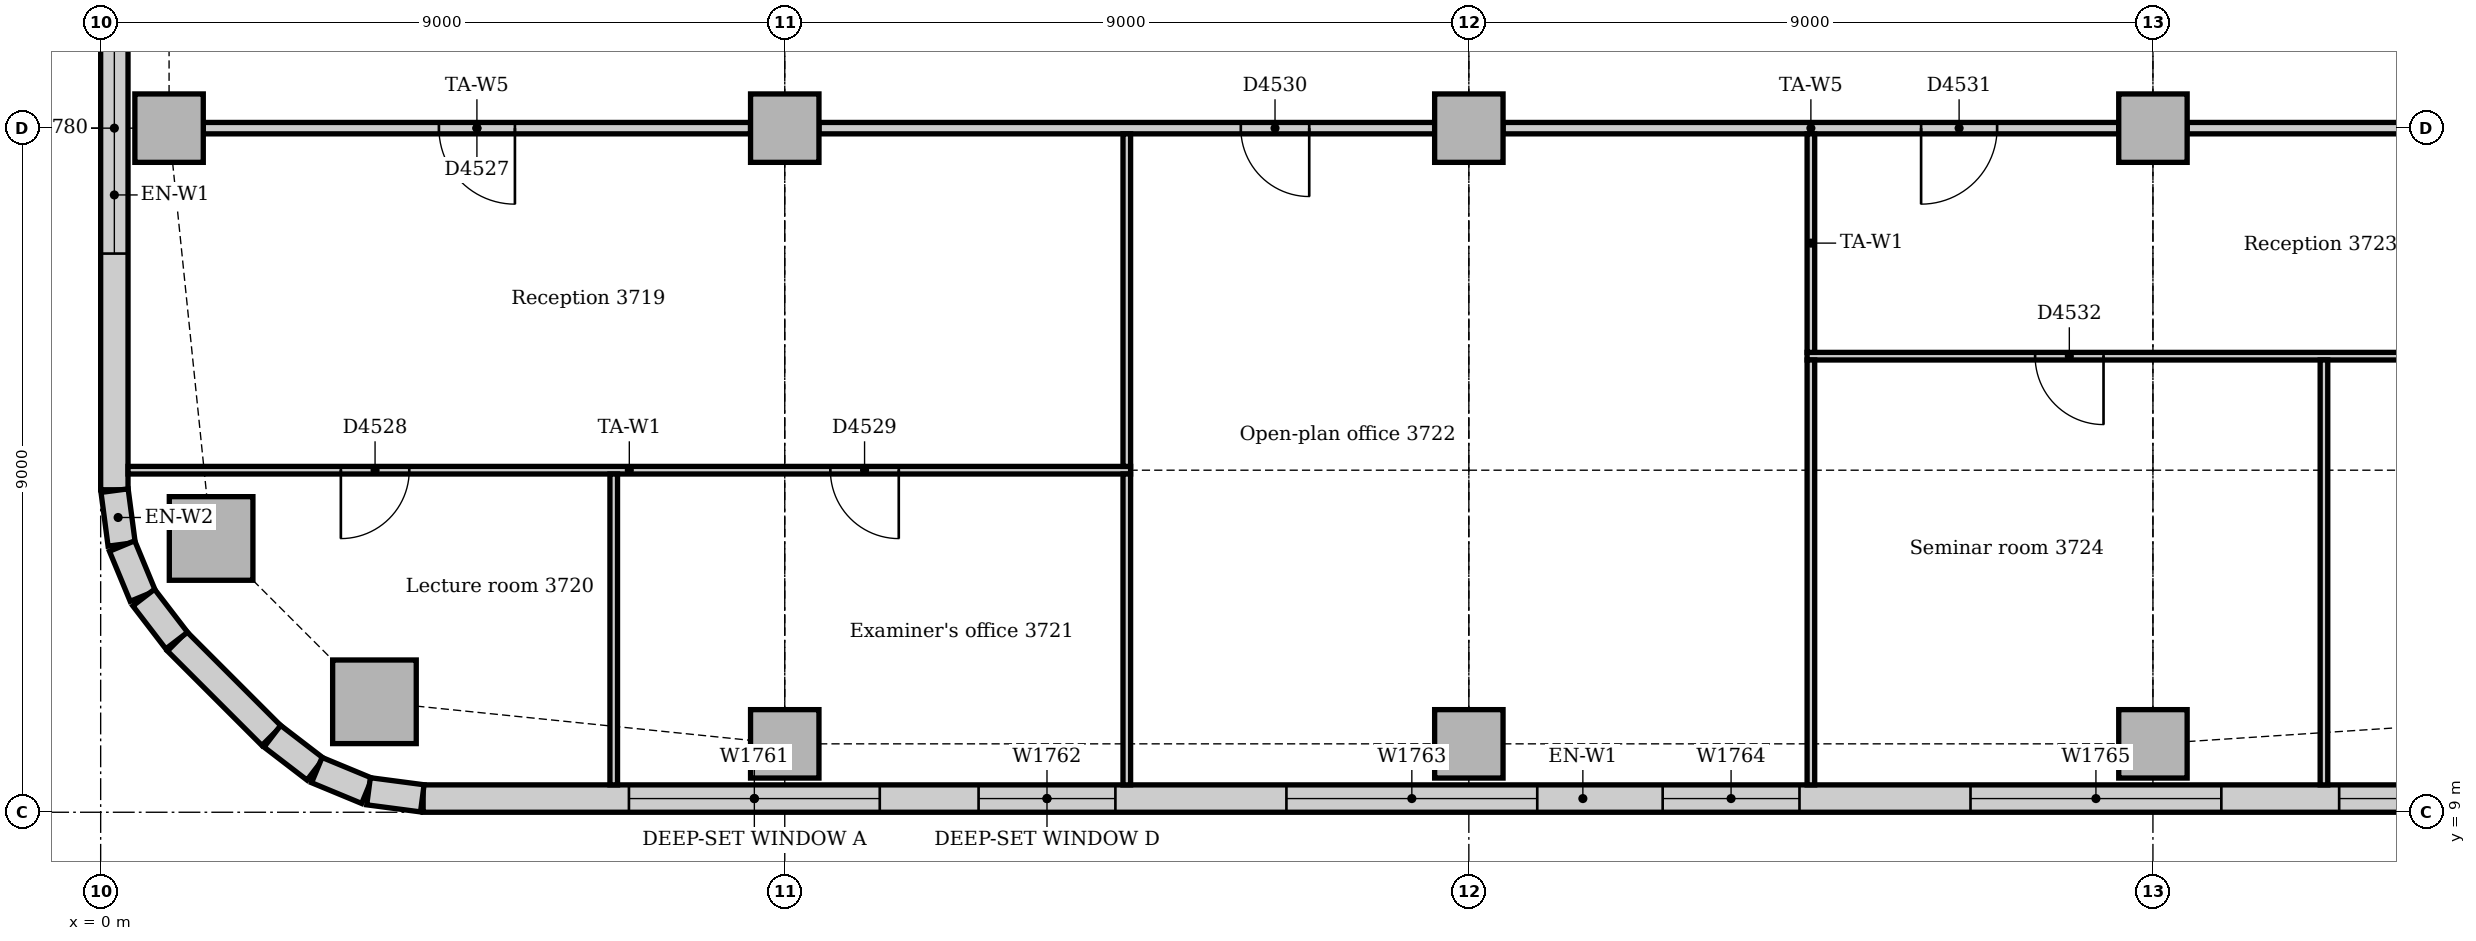
"""IFC4 building model, lengths in metres.
Left out: names, types, materials, properties, quantities, classifications, styles, units other than length and angle.
Written with IfcOpenShell. Run it as: python <this file> out.ifc"""

import sys

from ifc_helpers import new_model, si_unit, direction, frame, frame_2d, origin, origin_2d, place, context, subcontext, project, spatial, rectangle, extrude, element, fill, save


model = new_model("IFC4")
c1 = context("Model", 3, precision=1e-05, world=origin(), true_north=direction((0.0, 1.0)))
c2 = subcontext(c1, "Body", "Model", "MODEL_VIEW")
j1 = project(units=[si_unit("LENGTHUNIT", "METRE"), si_unit("PLANEANGLEUNIT", "RADIAN")], contexts=[c1])
p1 = place(None, origin())
s1 = spatial("IfcSite", under=j1, at=p1, CompositionType="ELEMENT")
p2 = place(p1, origin())
s2 = spatial("IfcBuilding", under=s1, at=p2, CompositionType="ELEMENT")
p3 = place(p2, frame((0.0, 0.0, 157.0)))
s3 = spatial("IfcBuildingStorey", under=s2, at=p3, CompositionType="ELEMENT", Elevation=157.0)
for number, where, z_axis, x_axis in (
    (1, (3.602, 10.453, 0.0), (0.0, 0.0, 1.0), (1.0, 0.0, 0.0)),
    (2, (1.453, 12.602, 0.0), (0.0, 0.0, 1.0), (1.0, 0.0, 0.0)),
):
    element("IfcColumn", number, at=place(p3, frame(where, z_axis=z_axis, x_axis=x_axis)), inside=s3, PredefinedType="COLUMN", context=c2, shape_type="SweptSolid", body=[
        extrude(rectangle(XDim=1.1, YDim=1.1, at=origin_2d()), origin(), (0.0, 0.0, 1.0), 3.85),
    ])
for number, where, z_axis, x_axis in (
    (3, (9.0, 9.9, 0.0), (0.0, 0.0, 1.0), (1.0, 0.0, 0.0)),
    (4, (18.0, 9.9, 0.0), (0.0, 0.0, 1.0), (1.0, 0.0, 0.0)),
    (5, (27.0, 9.9, 0.0), (0.0, 0.0, 1.0), (1.0, 0.0, 0.0)),
    (6, (0.9, 18.0, 0.0), (0.0, 0.0, 1.0), (1.0, 0.0, 0.0)),
    (7, (9.0, 18.0, 0.0), (0.0, 0.0, 1.0), (1.0, 0.0, 0.0)),
    (8, (18.0, 18.0, 0.0), (0.0, 0.0, 1.0), (1.0, 0.0, 0.0)),
    (9, (27.0, 18.0, 0.0), (0.0, 0.0, 1.0), (1.0, 0.0, 0.0)),
):
    element("IfcColumn", number, at=place(p3, frame(where, z_axis=z_axis, x_axis=x_axis)), inside=s3, PredefinedType="COLUMN", context=c2, shape_type="SweptSolid", body=[
        extrude(rectangle(XDim=0.9, YDim=0.9, at=origin_2d()), origin(), (0.0, 0.0, 1.0), 3.85),
    ])
p4 = place(p3, frame((4.243, 9.18, 0.0), z_axis=(0.0, 0.0, 1.0), x_axis=(1.0, 0.0, 0.0)))
e10 = element("IfcWall", 10, at=p4, inside=s3, PredefinedType="STANDARD", context=c2, shape_type="SweptSolid", body=[
    extrude(rectangle(XDim=30.515, YDim=0.36, at=frame_2d((15.257, 0.0))), origin(), (0.0, 0.0, 1.0), 3.85),
])
p5 = place(p4, frame((2.707, 0.0, 0.9)))
e11 = element("IfcOpeningElement", 11, at=p5, cuts=e10, PredefinedType="OPENING", context=c2, shape_type="SweptSolid", body=[
    extrude(rectangle(XDim=3.3, YDim=1.6, at=frame_2d((1.65, 0.8))), frame((0.0, 0.19, 0.0), z_axis=(0.0, -1.0, 0.0), x_axis=(1.0, 0.0, 0.0)), (0.0, 0.0, 1.0), 0.38),
])
p6 = place(p4, frame((7.307, 0.0, 0.9)))
e12 = element("IfcOpeningElement", 12, at=p6, cuts=e10, PredefinedType="OPENING", context=c2, shape_type="SweptSolid", body=[
    extrude(rectangle(XDim=1.8, YDim=1.6, at=frame_2d((0.9, 0.8))), frame((0.0, 0.19, 0.0), z_axis=(0.0, -1.0, 0.0), x_axis=(1.0, 0.0, 0.0)), (0.0, 0.0, 1.0), 0.38),
])
p7 = place(p4, frame((11.357, 0.0, 0.9)))
e13 = element("IfcOpeningElement", 13, at=p7, cuts=e10, PredefinedType="OPENING", context=c2, shape_type="SweptSolid", body=[
    extrude(rectangle(XDim=3.3, YDim=1.6, at=frame_2d((1.65, 0.8))), frame((0.0, 0.19, 0.0), z_axis=(0.0, -1.0, 0.0), x_axis=(1.0, 0.0, 0.0)), (0.0, 0.0, 1.0), 0.38),
])
p8 = place(p4, frame((16.307, 0.0, 0.9)))
e14 = element("IfcOpeningElement", 14, at=p8, cuts=e10, PredefinedType="OPENING", context=c2, shape_type="SweptSolid", body=[
    extrude(rectangle(XDim=1.8, YDim=1.6, at=frame_2d((0.9, 0.8))), frame((0.0, 0.19, 0.0), z_axis=(0.0, -1.0, 0.0), x_axis=(1.0, 0.0, 0.0)), (0.0, 0.0, 1.0), 0.38),
])
p9 = place(p4, frame((20.357, 0.0, 0.9)))
e15 = element("IfcOpeningElement", 15, at=p9, cuts=e10, PredefinedType="OPENING", context=c2, shape_type="SweptSolid", body=[
    extrude(rectangle(XDim=3.3, YDim=1.6, at=frame_2d((1.65, 0.8))), frame((0.0, 0.19, 0.0), z_axis=(0.0, -1.0, 0.0), x_axis=(1.0, 0.0, 0.0)), (0.0, 0.0, 1.0), 0.38),
])
p10 = place(p4, frame((25.207, 0.0, 0.9)))
e16 = element("IfcOpeningElement", 16, at=p10, cuts=e10, PredefinedType="OPENING", context=c2, shape_type="SweptSolid", body=[
    extrude(rectangle(XDim=3.3, YDim=1.6, at=frame_2d((1.65, 0.8))), frame((0.0, 0.19, 0.0), z_axis=(0.0, -1.0, 0.0), x_axis=(1.0, 0.0, 0.0)), (0.0, 0.0, 1.0), 0.38),
])
p11 = place(p3, frame((0.18, 21.0, 0.0), z_axis=(0.0, 0.0, 1.0), x_axis=(0.0, -1.0, 0.0)))
e17 = element("IfcWall", 17, at=p11, inside=s3, PredefinedType="STANDARD", context=c2, shape_type="SweptSolid", body=[
    extrude(rectangle(XDim=7.757, YDim=0.36, at=frame_2d((3.879, 0.0))), origin(), (0.0, 0.0, 1.0), 3.85),
])
p12 = place(p11, frame((1.35, 0.0, 0.9)))
e18 = element("IfcOpeningElement", 18, at=p12, cuts=e17, PredefinedType="OPENING", context=c2, shape_type="SweptSolid", body=[
    extrude(rectangle(XDim=3.3, YDim=1.6, at=frame_2d((1.65, 0.8))), frame((0.0, 0.19, 0.0), z_axis=(0.0, -1.0, 0.0), x_axis=(1.0, 0.0, 0.0)), (0.0, 0.0, 1.0), 0.38),
])
p13 = place(p3, frame((1.006, 11.249, 0.0), z_axis=(0.0, 0.0, 1.0), x_axis=(0.707106781187, -0.707106781187, 0.0)))
e19 = element("IfcWall", 19, at=p13, inside=s3, PredefinedType="STANDARD", context=c2, shape_type="SweptSolid", body=[
    extrude(rectangle(XDim=1.757, YDim=0.36, at=frame_2d((0.879, 0.0))), origin(), (0.0, 0.0, 1.0), 3.85),
])
for number, where, z_axis, x_axis in (
    (20, (0.183, 13.231, 0.0), (0.0, 0.0, 1.0), (0.131, -0.991, 0.0)),
    (21, (0.282, 12.503, 0.0), (0.0, 0.0, 1.0), (0.383, -0.924, 0.0)),
):
    element("IfcWall", number, at=place(p3, frame(where, z_axis=z_axis, x_axis=x_axis)), inside=s3, PredefinedType="STANDARD", context=c2, shape_type="SweptSolid", body=[
        extrude(rectangle(XDim=0.713, YDim=0.36, at=frame_2d((0.356, 0.0))), origin(), (0.0, 0.0, 1.0), 3.85),
    ])
for number, where, z_axis, x_axis in (
    (22, (0.566, 11.825, 0.0), (0.0, 0.0, 1.0), (0.609, -0.793, 0.0)),
    (23, (2.259, 10.0, 0.0), (0.0, 0.0, 1.0), (0.793, -0.609, 0.0)),
):
    element("IfcWall", number, at=place(p3, frame(where, z_axis=z_axis, x_axis=x_axis)), inside=s3, PredefinedType="STANDARD", context=c2, shape_type="SweptSolid", body=[
        extrude(rectangle(XDim=0.713, YDim=0.36, at=frame_2d((0.357, 0.0))), origin(), (0.0, 0.0, 1.0), 3.85),
    ])
for number, where, z_axis, x_axis in (
    (24, (2.844, 9.555, 0.0), (0.0, 0.0, 1.0), (0.924, -0.383, 0.0)),
    (25, (3.524, 9.276, 0.0), (0.0, 0.0, 1.0), (0.991, -0.131, 0.0)),
):
    element("IfcWall", number, at=place(p3, frame(where, z_axis=z_axis, x_axis=x_axis)), inside=s3, PredefinedType="STANDARD", context=c2, shape_type="SweptSolid", body=[
        extrude(rectangle(XDim=0.713, YDim=0.36, at=frame_2d((0.356, 0.0))), origin(), (0.0, 0.0, 1.0), 3.85),
    ])
p14 = place(p3, frame((1.35, 18.0, 0.0), z_axis=(0.0, 0.0, 1.0), x_axis=(1.0, 0.0, 0.0)))
e26 = element("IfcWall", 26, at=p14, inside=s3, PredefinedType="PARTITIONING", context=c2, shape_type="SweptSolid", body=[
    extrude(rectangle(XDim=7.2, YDim=0.15, at=frame_2d((3.6, 0.0))), origin(), (0.0, 0.0, 1.0), 3.262),
])
p15 = place(p14, frame((3.1, 0.0, 0.0)))
e27 = element("IfcOpeningElement", 27, at=p15, cuts=e26, PredefinedType="OPENING", context=c2, shape_type="SweptSolid", body=[
    extrude(rectangle(XDim=1.0, YDim=2.1, at=frame_2d((0.5, 1.05))), frame((0.0, 0.085, 0.0), z_axis=(0.0, -1.0, 0.0), x_axis=(1.0, 0.0, 0.0)), (0.0, 0.0, 1.0), 0.17),
])
p16 = place(p3, frame((9.45, 18.0, 0.0), z_axis=(0.0, 0.0, 1.0), x_axis=(1.0, 0.0, 0.0)))
e28 = element("IfcWall", 28, at=p16, inside=s3, PredefinedType="PARTITIONING", context=c2, shape_type="SweptSolid", body=[
    extrude(rectangle(XDim=8.1, YDim=0.15, at=frame_2d((4.05, 0.0))), origin(), (0.0, 0.0, 1.0), 3.262),
])
p17 = place(p16, frame((5.55, 0.0, 0.0)))
e29 = element("IfcOpeningElement", 29, at=p17, cuts=e28, PredefinedType="OPENING", context=c2, shape_type="SweptSolid", body=[
    extrude(rectangle(XDim=0.9, YDim=2.1, at=frame_2d((0.45, 1.05))), frame((0.0, 0.085, 0.0), z_axis=(0.0, -1.0, 0.0), x_axis=(1.0, 0.0, 0.0)), (0.0, 0.0, 1.0), 0.17),
])
p18 = place(p3, frame((18.45, 18.0, 0.0), z_axis=(0.0, 0.0, 1.0), x_axis=(1.0, 0.0, 0.0)))
e30 = element("IfcWall", 30, at=p18, inside=s3, PredefinedType="PARTITIONING", context=c2, shape_type="SweptSolid", body=[
    extrude(rectangle(XDim=8.1, YDim=0.15, at=frame_2d((4.05, 0.0))), origin(), (0.0, 0.0, 1.0), 3.262),
])
p19 = place(p18, frame((5.5, 0.0, 0.0)))
e31 = element("IfcOpeningElement", 31, at=p19, cuts=e30, PredefinedType="OPENING", context=c2, shape_type="SweptSolid", body=[
    extrude(rectangle(XDim=1.0, YDim=2.1, at=frame_2d((0.5, 1.05))), frame((0.0, 0.085, 0.0), z_axis=(0.0, -1.0, 0.0), x_axis=(1.0, 0.0, 0.0)), (0.0, 0.0, 1.0), 0.17),
])
p20 = place(p3, frame((27.45, 18.0, 0.0), z_axis=(0.0, 0.0, 1.0), x_axis=(1.0, 0.0, 0.0)))
e32 = element("IfcWall", 32, at=p20, inside=s3, PredefinedType="PARTITIONING", context=c2, shape_type="SweptSolid", body=[
    extrude(rectangle(XDim=8.1, YDim=0.15, at=frame_2d((4.05, 0.0))), origin(), (0.0, 0.0, 1.0), 3.262),
])
p21 = place(p3, frame((22.45, 15.0, 0.0), z_axis=(0.0, 0.0, 1.0), x_axis=(1.0, 0.0, 0.0)))
e33 = element("IfcWall", 33, at=p21, inside=s3, PredefinedType="PARTITIONING", context=c2, shape_type="SweptSolid", body=[
    extrude(rectangle(XDim=13.6, YDim=0.1, at=frame_2d((6.8, 0.0))), origin(), (0.0, 0.0, 1.0), 3.85),
])
p22 = place(p21, frame((3.0, 0.0, 0.0)))
e34 = element("IfcOpeningElement", 34, at=p22, cuts=e33, PredefinedType="OPENING", context=c2, shape_type="SweptSolid", body=[
    extrude(rectangle(XDim=0.9, YDim=2.1, at=frame_2d((0.45, 1.05))), frame((0.0, 0.06, 0.0), z_axis=(0.0, -1.0, 0.0), x_axis=(1.0, 0.0, 0.0)), (0.0, 0.0, 1.0), 0.12),
])
p23 = place(p21, frame((9.65, 0.0, 0.0)))
e35 = element("IfcOpeningElement", 35, at=p23, cuts=e33, PredefinedType="OPENING", context=c2, shape_type="SweptSolid", body=[
    extrude(rectangle(XDim=0.9, YDim=2.1, at=frame_2d((0.45, 1.05))), frame((0.0, 0.06, 0.0), z_axis=(0.0, -1.0, 0.0), x_axis=(1.0, 0.0, 0.0)), (0.0, 0.0, 1.0), 0.12),
])
p24 = place(p3, frame((0.36, 13.5, 0.0), z_axis=(0.0, 0.0, 1.0), x_axis=(1.0, 0.0, 0.0)))
e36 = element("IfcWall", 36, at=p24, inside=s3, PredefinedType="PARTITIONING", context=c2, shape_type="SweptSolid", body=[
    extrude(rectangle(XDim=13.19, YDim=0.1, at=frame_2d((6.595, 0.0))), origin(), (0.0, 0.0, 1.0), 3.4),
])
p25 = place(p24, frame((2.8, 0.0, 0.0)))
e37 = element("IfcOpeningElement", 37, at=p25, cuts=e36, PredefinedType="OPENING", context=c2, shape_type="SweptSolid", body=[
    extrude(rectangle(XDim=0.9, YDim=2.1, at=frame_2d((0.45, 1.05))), frame((0.0, 0.06, 0.0), z_axis=(0.0, -1.0, 0.0), x_axis=(1.0, 0.0, 0.0)), (0.0, 0.0, 1.0), 0.12),
])
p26 = place(p24, frame((9.24, 0.0, 0.0)))
e38 = element("IfcOpeningElement", 38, at=p26, cuts=e36, PredefinedType="OPENING", context=c2, shape_type="SweptSolid", body=[
    extrude(rectangle(XDim=0.9, YDim=2.1, at=frame_2d((0.45, 1.05))), frame((0.0, 0.06, 0.0), z_axis=(0.0, -1.0, 0.0), x_axis=(1.0, 0.0, 0.0)), (0.0, 0.0, 1.0), 0.12),
])
p27 = place(p3, frame((13.5, 13.55, 0.0), z_axis=(0.0, 0.0, 1.0), x_axis=(0.0, 1.0, 0.0)))
e39 = element("IfcWall", 39, at=p27, inside=s3, PredefinedType="PARTITIONING", context=c2, shape_type="SweptSolid", body=[
    extrude(rectangle(XDim=4.375, YDim=0.1, at=frame_2d((2.188, 0.0))), origin(), (0.0, 0.0, 1.0), 3.85),
])
p28 = place(p3, frame((13.5, 9.36, 0.0), z_axis=(0.0, 0.0, 1.0), x_axis=(0.0, 1.0, 0.0)))
e40 = element("IfcWall", 40, at=p28, inside=s3, PredefinedType="PARTITIONING", context=c2, shape_type="SweptSolid", body=[
    extrude(rectangle(XDim=4.09, YDim=0.1, at=frame_2d((2.045, 0.0))), origin(), (0.0, 0.0, 1.0), 3.85),
])
p29 = place(p3, frame((22.5, 15.05, 0.0), z_axis=(0.0, 0.0, 1.0), x_axis=(0.0, 1.0, 0.0)))
e41 = element("IfcWall", 41, at=p29, inside=s3, PredefinedType="PARTITIONING", context=c2, shape_type="SweptSolid", body=[
    extrude(rectangle(XDim=2.875, YDim=0.1, at=frame_2d((1.438, 0.0))), origin(), (0.0, 0.0, 1.0), 3.85),
])
for number, where, z_axis, x_axis in (
    (42, (22.5, 9.36, 0.0), (0.0, 0.0, 1.0), (0.0, 1.0, 0.0)),
    (43, (29.25, 9.36, 0.0), (0.0, 0.0, 1.0), (0.0, 1.0, 0.0)),
):
    element("IfcWall", number, at=place(p3, frame(where, z_axis=z_axis, x_axis=x_axis)), inside=s3, PredefinedType="PARTITIONING", context=c2, shape_type="SweptSolid", body=[
        extrude(rectangle(XDim=5.59, YDim=0.1, at=frame_2d((2.795, 0.0))), origin(), (0.0, 0.0, 1.0), 3.85),
    ])
p30 = place(p3, frame((6.75, 9.36, 0.0), z_axis=(0.0, 0.0, 1.0), x_axis=(0.0, 1.0, 0.0)))
e44 = element("IfcWall", 44, at=p30, inside=s3, PredefinedType="PARTITIONING", context=c2, shape_type="SweptSolid", body=[
    extrude(rectangle(XDim=4.09, YDim=0.1, at=frame_2d((2.045, 0.0))), origin(), (0.0, 0.0, 1.0), 3.85),
])
p31 = place(p5, origin())
e45 = element("IfcWindow", 45, at=p31, inside=s3, PartitioningType="SINGLE_PANEL", PredefinedType="WINDOW", context=c2, shape_type="SweptSolid", body=[
    extrude(rectangle(XDim=3.3, YDim=1.6, at=frame_2d((1.65, 0.8))), frame((0.0, 0.13, 0.0), z_axis=(0.0, -1.0, 0.0), x_axis=(1.0, 0.0, 0.0)), (0.0, 0.0, 1.0), 0.06),
])
fill(e11, e45)
p32 = place(p6, origin())
e46 = element("IfcWindow", 46, at=p32, inside=s3, PartitioningType="SINGLE_PANEL", PredefinedType="WINDOW", context=c2, shape_type="SweptSolid", body=[
    extrude(rectangle(XDim=1.8, YDim=1.6, at=frame_2d((0.9, 0.8))), frame((0.0, 0.13, 0.0), z_axis=(0.0, -1.0, 0.0), x_axis=(1.0, 0.0, 0.0)), (0.0, 0.0, 1.0), 0.06),
])
fill(e12, e46)
p33 = place(p7, origin())
e47 = element("IfcWindow", 47, at=p33, inside=s3, PartitioningType="SINGLE_PANEL", PredefinedType="WINDOW", context=c2, shape_type="SweptSolid", body=[
    extrude(rectangle(XDim=3.3, YDim=1.6, at=frame_2d((1.65, 0.8))), frame((0.0, 0.13, 0.0), z_axis=(0.0, -1.0, 0.0), x_axis=(1.0, 0.0, 0.0)), (0.0, 0.0, 1.0), 0.06),
])
fill(e13, e47)
p34 = place(p8, origin())
e48 = element("IfcWindow", 48, at=p34, inside=s3, PartitioningType="SINGLE_PANEL", PredefinedType="WINDOW", context=c2, shape_type="SweptSolid", body=[
    extrude(rectangle(XDim=1.8, YDim=1.6, at=frame_2d((0.9, 0.8))), frame((0.0, 0.13, 0.0), z_axis=(0.0, -1.0, 0.0), x_axis=(1.0, 0.0, 0.0)), (0.0, 0.0, 1.0), 0.06),
])
fill(e14, e48)
p35 = place(p9, origin())
e49 = element("IfcWindow", 49, at=p35, inside=s3, PartitioningType="SINGLE_PANEL", PredefinedType="WINDOW", context=c2, shape_type="SweptSolid", body=[
    extrude(rectangle(XDim=3.3, YDim=1.6, at=frame_2d((1.65, 0.8))), frame((0.0, 0.13, 0.0), z_axis=(0.0, -1.0, 0.0), x_axis=(1.0, 0.0, 0.0)), (0.0, 0.0, 1.0), 0.06),
])
fill(e15, e49)
p36 = place(p10, origin())
e50 = element("IfcWindow", 50, at=p36, inside=s3, PartitioningType="SINGLE_PANEL", PredefinedType="WINDOW", context=c2, shape_type="SweptSolid", body=[
    extrude(rectangle(XDim=3.3, YDim=1.6, at=frame_2d((1.65, 0.8))), frame((0.0, 0.13, 0.0), z_axis=(0.0, -1.0, 0.0), x_axis=(1.0, 0.0, 0.0)), (0.0, 0.0, 1.0), 0.06),
])
fill(e16, e50)
p37 = place(p12, origin())
e51 = element("IfcWindow", 51, at=p37, inside=s3, PartitioningType="SINGLE_PANEL", PredefinedType="WINDOW", context=c2, shape_type="SweptSolid", body=[
    extrude(rectangle(XDim=3.3, YDim=1.6, at=frame_2d((1.65, 0.8))), frame((0.0, 0.13, 0.0), z_axis=(0.0, -1.0, 0.0), x_axis=(1.0, 0.0, 0.0)), (0.0, 0.0, 1.0), 0.06),
])
fill(e18, e51)
p38 = place(p15, frame((1.0, 0.0, 0.0), z_axis=(0.0, 0.0, 1.0), x_axis=(-1.0, 0.0, 0.0)))
e52 = element("IfcDoor", 52, at=p38, inside=s3, OperationType="SINGLE_SWING_LEFT", PredefinedType="DOOR", context=c2, shape_type="SweptSolid", body=[
    extrude(rectangle(XDim=1.0, YDim=2.1, at=frame_2d((0.5, 1.05))), frame((0.0, 0.025, 0.0), z_axis=(0.0, -1.0, 0.0), x_axis=(1.0, 0.0, 0.0)), (0.0, 0.0, 1.0), 0.05),
])
fill(e27, e52)
p39 = place(p25, frame((0.9, 0.0, 0.0), z_axis=(0.0, 0.0, 1.0), x_axis=(-1.0, 0.0, 0.0)))
e53 = element("IfcDoor", 53, at=p39, inside=s3, OperationType="SINGLE_SWING_RIGHT", PredefinedType="DOOR", context=c2, shape_type="SweptSolid", body=[
    extrude(rectangle(XDim=0.9, YDim=2.1, at=frame_2d((0.45, 1.05))), frame((0.0, 0.025, 0.0), z_axis=(0.0, -1.0, 0.0), x_axis=(1.0, 0.0, 0.0)), (0.0, 0.0, 1.0), 0.05),
])
fill(e37, e53)
p40 = place(p26, frame((0.9, 0.0, 0.0), z_axis=(0.0, 0.0, 1.0), x_axis=(-1.0, 0.0, 0.0)))
e54 = element("IfcDoor", 54, at=p40, inside=s3, OperationType="SINGLE_SWING_LEFT", PredefinedType="DOOR", context=c2, shape_type="SweptSolid", body=[
    extrude(rectangle(XDim=0.9, YDim=2.1, at=frame_2d((0.45, 1.05))), frame((0.0, 0.025, 0.0), z_axis=(0.0, -1.0, 0.0), x_axis=(1.0, 0.0, 0.0)), (0.0, 0.0, 1.0), 0.05),
])
fill(e38, e54)
p41 = place(p17, frame((0.9, 0.0, 0.0), z_axis=(0.0, 0.0, 1.0), x_axis=(-1.0, 0.0, 0.0)))
e55 = element("IfcDoor", 55, at=p41, inside=s3, OperationType="SINGLE_SWING_LEFT", PredefinedType="DOOR", context=c2, shape_type="SweptSolid", body=[
    extrude(rectangle(XDim=0.9, YDim=2.1, at=frame_2d((0.45, 1.05))), frame((0.0, 0.025, 0.0), z_axis=(0.0, -1.0, 0.0), x_axis=(1.0, 0.0, 0.0)), (0.0, 0.0, 1.0), 0.05),
])
fill(e29, e55)
p42 = place(p19, frame((1.0, 0.0, 0.0), z_axis=(0.0, 0.0, 1.0), x_axis=(-1.0, 0.0, 0.0)))
e56 = element("IfcDoor", 56, at=p42, inside=s3, OperationType="SINGLE_SWING_RIGHT", PredefinedType="DOOR", context=c2, shape_type="SweptSolid", body=[
    extrude(rectangle(XDim=1.0, YDim=2.1, at=frame_2d((0.5, 1.05))), frame((0.0, 0.025, 0.0), z_axis=(0.0, -1.0, 0.0), x_axis=(1.0, 0.0, 0.0)), (0.0, 0.0, 1.0), 0.05),
])
fill(e31, e56)
p43 = place(p22, frame((0.9, 0.0, 0.0), z_axis=(0.0, 0.0, 1.0), x_axis=(-1.0, 0.0, 0.0)))
e57 = element("IfcDoor", 57, at=p43, inside=s3, OperationType="SINGLE_SWING_LEFT", PredefinedType="DOOR", context=c2, shape_type="SweptSolid", body=[
    extrude(rectangle(XDim=0.9, YDim=2.1, at=frame_2d((0.45, 1.05))), frame((0.0, 0.025, 0.0), z_axis=(0.0, -1.0, 0.0), x_axis=(1.0, 0.0, 0.0)), (0.0, 0.0, 1.0), 0.05),
])
fill(e34, e57)
save(model, sys.argv[1])
